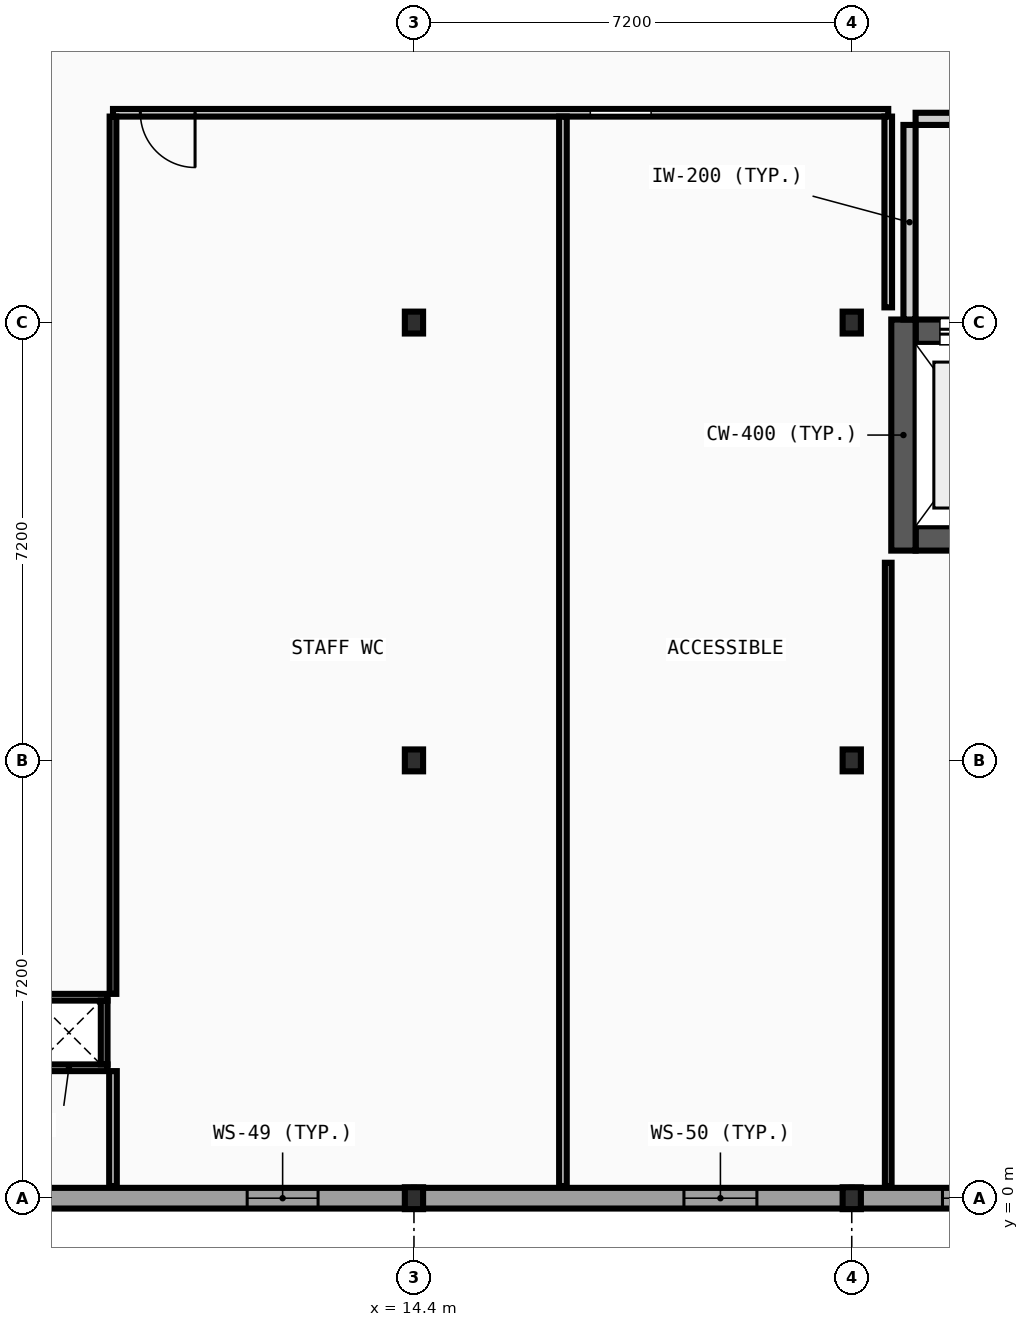
"""IFC4 building model, lengths in metres.
Left out: names, types, materials, properties, quantities, classifications, styles, units other than length and angle.
Written with IfcOpenShell. Run it as: python <this file> out.ifc"""

import sys

from ifc_helpers import new_model, si_unit, direction, frame, frame_2d, origin, origin_2d, place, context, subcontext, project, spatial, rectangle, i_section, extrude, element, fill, save


model = new_model("IFC4")
c1 = context("Model", 3, precision=1e-05, world=origin(), true_north=direction((0.0, 1.0)))
c2 = subcontext(c1, "Body", "Model", "MODEL_VIEW")
j1 = project(units=[si_unit("LENGTHUNIT", "METRE"), si_unit("PLANEANGLEUNIT", "RADIAN")], contexts=[c1])
p1 = place(None, origin())
s1 = spatial("IfcSite", under=j1, at=p1, CompositionType="ELEMENT")
p2 = place(p1, origin())
s2 = spatial("IfcBuilding", under=s1, at=p2, CompositionType="ELEMENT")
p3 = place(p2, frame((0.0, 0.0, 18.4)))
s3 = spatial("IfcBuildingStorey", under=s2, at=p3, CompositionType="ELEMENT", Elevation=18.4)
for number, where, z_axis, x_axis in (
    (1, (14.4, 0.0, 0.0), (0.0, 0.0, 1.0), (1.0, 0.0, 0.0)),
    (2, (14.4, 7.2, 0.0), (0.0, 0.0, 1.0), (1.0, 0.0, 0.0)),
    (3, (14.4, 14.4, 0.0), (0.0, 0.0, 1.0), (1.0, 0.0, 0.0)),
    (4, (21.6, 0.0, 0.0), (0.0, 0.0, 1.0), (1.0, 0.0, 0.0)),
    (5, (21.6, 7.2, 0.0), (0.0, 0.0, 1.0), (1.0, 0.0, 0.0)),
    (6, (21.6, 14.4, 0.0), (0.0, 0.0, 1.0), (1.0, 0.0, 0.0)),
):
    element("IfcColumn", number, at=place(p3, frame(where, z_axis=z_axis, x_axis=x_axis)), inside=s3, PredefinedType="COLUMN", context=c2, shape_type="SweptSolid", body=[
        extrude(i_section(OverallWidth=0.3, OverallDepth=0.36, WebThickness=0.012, FlangeThickness=0.022, FilletRadius=0.027, at=origin_2d()), origin(), (0.0, 0.0, 1.0), 4.4),
    ])
p4 = place(p3, frame((7.2, 0.0, 0.0), z_axis=(0.0, 0.0, 1.0), x_axis=(1.0, 0.0, 0.0)))
e7 = element("IfcWall", 7, at=p4, inside=s3, PredefinedType="STANDARD", context=c2, shape_type="SweptSolid", body=[
    extrude(rectangle(XDim=7.2, YDim=0.34, at=frame_2d((3.6, 0.0))), origin(), (0.0, 0.0, 1.0), 3.95),
])
p5 = place(p4, frame((4.457, 0.0, 0.95)))
e8 = element("IfcOpeningElement", 8, at=p5, cuts=e7, PredefinedType="OPENING", context=c2, shape_type="SweptSolid", body=[
    extrude(rectangle(XDim=1.166, YDim=1.368, at=frame_2d((0.583, 0.684))), frame((0.0, 0.18, 0.0), z_axis=(0.0, -1.0, 0.0), x_axis=(1.0, 0.0, 0.0)), (0.0, 0.0, 1.0), 0.36),
])
p6 = place(p3, frame((14.4, 0.0, 0.0), z_axis=(0.0, 0.0, 1.0), x_axis=(1.0, 0.0, 0.0)))
e9 = element("IfcWall", 9, at=p6, inside=s3, PredefinedType="STANDARD", context=c2, shape_type="SweptSolid", body=[
    extrude(rectangle(XDim=7.2, YDim=0.34, at=frame_2d((3.6, 0.0))), origin(), (0.0, 0.0, 1.0), 3.95),
])
p7 = place(p6, frame((4.44, 0.0, 0.95)))
e10 = element("IfcOpeningElement", 10, at=p7, cuts=e9, PredefinedType="OPENING", context=c2, shape_type="SweptSolid", body=[
    extrude(rectangle(XDim=1.2, YDim=1.368, at=frame_2d((0.6, 0.684))), frame((0.0, 0.18, 0.0), z_axis=(0.0, -1.0, 0.0), x_axis=(1.0, 0.0, 0.0)), (0.0, 0.0, 1.0), 0.36),
])
p8 = place(p3, frame((21.6, 0.0, 0.0), z_axis=(0.0, 0.0, 1.0), x_axis=(1.0, 0.0, 0.0)))
e11 = element("IfcWall", 11, at=p8, inside=s3, PredefinedType="STANDARD", context=c2, shape_type="SweptSolid", body=[
    extrude(rectangle(XDim=7.03, YDim=0.34, at=frame_2d((3.515, 0.0))), origin(), (0.0, 0.0, 1.0), 3.95),
])
p9 = place(p8, frame((1.492, 0.0, 0.95)))
e12 = element("IfcOpeningElement", 12, at=p9, cuts=e11, PredefinedType="OPENING", context=c2, shape_type="SweptSolid", body=[
    extrude(rectangle(XDim=1.234, YDim=1.368, at=frame_2d((0.617, 0.684))), frame((0.0, 0.18, 0.0), z_axis=(0.0, -1.0, 0.0), x_axis=(1.0, 0.0, 0.0)), (0.0, 0.0, 1.0), 0.36),
])
p10 = place(p8, frame((4.304, 0.0, 0.95)))
e13 = element("IfcOpeningElement", 13, at=p10, cuts=e11, PredefinedType="OPENING", context=c2, shape_type="SweptSolid", body=[
    extrude(rectangle(XDim=1.234, YDim=1.368, at=frame_2d((0.617, 0.684))), frame((0.0, 0.18, 0.0), z_axis=(0.0, -1.0, 0.0), x_axis=(1.0, 0.0, 0.0)), (0.0, 0.0, 1.0), 0.36),
])
p11 = place(p3, frame((22.65, 10.85, 0.0), z_axis=(0.0, 0.0, 1.0), x_axis=(1.0, 0.0, 0.0)))
e14 = element("IfcWall", 14, at=p11, inside=s3, PredefinedType="SHEAR", context=c2, shape_type="SweptSolid", body=[
    extrude(rectangle(XDim=2.2, YDim=0.4, at=frame_2d((1.1, 0.0))), origin(), (0.0, 0.0, 1.0), 4.215),
])
p12 = place(p3, frame((22.65, 14.25, 0.0), z_axis=(0.0, 0.0, 1.0), x_axis=(1.0, 0.0, 0.0)))
e15 = element("IfcWall", 15, at=p12, inside=s3, PredefinedType="SHEAR", context=c2, shape_type="SweptSolid", body=[
    extrude(rectangle(XDim=2.2, YDim=0.4, at=frame_2d((1.1, 0.0))), origin(), (0.0, 0.0, 1.0), 4.215),
])
p13 = place(p12, frame((0.4, 0.0, 0.0)))
e16 = element("IfcOpeningElement", 16, at=p13, cuts=e15, PredefinedType="OPENING", context=c2, shape_type="SweptSolid", body=[
    extrude(rectangle(XDim=1.4, YDim=2.2, at=frame_2d((0.7, 1.1))), frame((0.0, 0.21, 0.0), z_axis=(0.0, -1.0, 0.0), x_axis=(1.0, 0.0, 0.0)), (0.0, 0.0, 1.0), 0.42),
])
p14 = place(p3, frame((22.45, 10.65, 0.0), z_axis=(0.0, 0.0, 1.0), x_axis=(0.0, 1.0, 0.0)))
e17 = element("IfcWall", 17, at=p14, inside=s3, PredefinedType="SHEAR", context=c2, shape_type="SweptSolid", body=[
    extrude(rectangle(XDim=3.8, YDim=0.4, at=frame_2d((1.9, 0.0))), origin(), (0.0, 0.0, 1.0), 4.215),
])
p15 = place(p3, frame((22.65, 17.75, 0.0), z_axis=(0.0, 0.0, 1.0), x_axis=(1.0, 0.0, 0.0)))
e18 = element("IfcWall", 18, at=p15, inside=s3, PredefinedType="PARTITIONING", context=c2, shape_type="SweptSolid", body=[
    extrude(rectangle(XDim=5.75, YDim=0.2, at=frame_2d((2.875, 0.0))), origin(), (0.0, 0.0, 1.0), 4.215),
])
p16 = place(p15, frame((2.075, 0.0, 0.0)))
e19 = element("IfcOpeningElement", 19, at=p16, cuts=e18, PredefinedType="OPENING", context=c2, shape_type="SweptSolid", body=[
    extrude(rectangle(XDim=1.6, YDim=2.2, at=frame_2d((0.8, 1.1))), frame((0.0, 0.11, 0.0), z_axis=(0.0, -1.0, 0.0), x_axis=(1.0, 0.0, 0.0)), (0.0, 0.0, 1.0), 0.22),
])
p17 = place(p3, frame((22.55, 14.45, 0.0), z_axis=(0.0, 0.0, 1.0), x_axis=(0.0, 1.0, 0.0)))
e20 = element("IfcWall", 20, at=p17, inside=s3, PredefinedType="PARTITIONING", context=c2, shape_type="SweptSolid", body=[
    extrude(rectangle(XDim=3.2, YDim=0.2, at=frame_2d((1.6, 0.0))), origin(), (0.0, 0.0, 1.0), 4.215),
])
for number, where, z_axis, x_axis in (
    (21, (8.09, 2.145, 0.0), (0.0, 0.0, 1.0), (1.0, 0.0, 0.0)),
    (22, (8.09, 3.305, 0.0), (0.0, 0.0, 1.0), (1.0, 0.0, 0.0)),
):
    element("IfcWall", number, at=place(p3, frame(where, z_axis=z_axis, x_axis=x_axis)), inside=s3, PredefinedType="PARTITIONING", context=c2, shape_type="SweptSolid", body=[
        extrude(rectangle(XDim=1.27, YDim=0.11, at=frame_2d((0.635, 0.0))), origin(), (0.0, 0.0, 1.0), 4.215),
    ])
p18 = place(p3, frame((9.305, 2.2, 0.0), z_axis=(0.0, 0.0, 1.0), x_axis=(0.0, 1.0, 0.0)))
e23 = element("IfcWall", 23, at=p18, inside=s3, PredefinedType="PARTITIONING", context=c2, shape_type="SweptSolid", body=[
    extrude(rectangle(XDim=1.05, YDim=0.11, at=frame_2d((0.525, 0.0))), origin(), (0.0, 0.0, 1.0), 4.215),
])
p19 = place(p3, frame((9.45, 17.85, 0.0), z_axis=(0.0, 0.0, 1.0), x_axis=(1.0, 0.0, 0.0)))
e24 = element("IfcWall", 24, at=p19, inside=s3, PredefinedType="PARTITIONING", context=c2, shape_type="SweptSolid", body=[
    extrude(rectangle(XDim=12.75, YDim=0.125, at=frame_2d((6.375, 0.0))), origin(), (0.0, 0.0, 1.0), 4.215),
])
p20 = place(p19, frame((7.85, 0.0, 0.0)))
e25 = element("IfcOpeningElement", 25, at=p20, cuts=e24, PredefinedType="OPENING", context=c2, shape_type="SweptSolid", body=[
    extrude(rectangle(XDim=1.0, YDim=2.1, at=frame_2d((0.5, 1.05))), frame((0.0, 0.073, 0.0), z_axis=(0.0, -1.0, 0.0), x_axis=(1.0, 0.0, 0.0)), (0.0, 0.0, 1.0), 0.145),
])
p21 = place(p19, frame((0.45, 0.0, 0.0)))
e26 = element("IfcOpeningElement", 26, at=p21, cuts=e24, PredefinedType="OPENING", context=c2, shape_type="SweptSolid", body=[
    extrude(rectangle(XDim=0.9, YDim=2.1, at=frame_2d((0.45, 1.05))), frame((0.0, 0.073, 0.0), z_axis=(0.0, -1.0, 0.0), x_axis=(1.0, 0.0, 0.0)), (0.0, 0.0, 1.0), 0.145),
])
p22 = place(p3, frame((9.45, 0.2, 0.0), z_axis=(0.0, 0.0, 1.0), x_axis=(0.0, 1.0, 0.0)))
e27 = element("IfcWall", 27, at=p22, inside=s3, PredefinedType="PARTITIONING", context=c2, shape_type="SweptSolid", body=[
    extrude(rectangle(XDim=1.89, YDim=0.125, at=frame_2d((0.945, 0.0))), origin(), (0.0, 0.0, 1.0), 3.96),
])
p23 = place(p3, frame((9.45, 3.36, 0.0), z_axis=(0.0, 0.0, 1.0), x_axis=(0.0, 1.0, 0.0)))
e28 = element("IfcWall", 28, at=p23, inside=s3, PredefinedType="PARTITIONING", context=c2, shape_type="SweptSolid", body=[
    extrude(rectangle(XDim=14.427, YDim=0.11, at=frame_2d((7.214, 0.0))), origin(), (0.0, 0.0, 1.0), 3.96),
])
p24 = place(p3, frame((16.85, 0.2, 0.0), z_axis=(0.0, 0.0, 1.0), x_axis=(0.0, 1.0, 0.0)))
e29 = element("IfcWall", 29, at=p24, inside=s3, PredefinedType="PARTITIONING", context=c2, shape_type="SweptSolid", body=[
    extrude(rectangle(XDim=17.588, YDim=0.125, at=frame_2d((8.794, 0.0))), origin(), (0.0, 0.0, 1.0), 3.96),
])
p25 = place(p3, frame((22.2, 0.2, 0.0), z_axis=(0.0, 0.0, 1.0), x_axis=(0.0, 1.0, 0.0)))
e30 = element("IfcWall", 30, at=p25, inside=s3, PredefinedType="PARTITIONING", context=c2, shape_type="SweptSolid", body=[
    extrude(rectangle(XDim=10.25, YDim=0.11, at=frame_2d((5.125, 0.0))), origin(), (0.0, 0.0, 1.0), 4.215),
])
p26 = place(p3, frame((22.2, 14.65, 0.0), z_axis=(0.0, 0.0, 1.0), x_axis=(0.0, 1.0, 0.0)))
e31 = element("IfcWall", 31, at=p26, inside=s3, PredefinedType="PARTITIONING", context=c2, shape_type="SweptSolid", body=[
    extrude(rectangle(XDim=3.138, YDim=0.125, at=frame_2d((1.569, 0.0))), origin(), (0.0, 0.0, 1.0), 4.215),
])
p27 = place(p5, origin())
e32 = element("IfcWindow", 32, at=p27, inside=s3, PartitioningType="SINGLE_PANEL", PredefinedType="WINDOW", context=c2, shape_type="SweptSolid", body=[
    extrude(rectangle(XDim=1.166, YDim=1.368, at=frame_2d((0.583, 0.684))), frame((0.0, 0.03, 0.0), z_axis=(0.0, -1.0, 0.0), x_axis=(1.0, 0.0, 0.0)), (0.0, 0.0, 1.0), 0.06),
])
fill(e8, e32)
p28 = place(p7, origin())
e33 = element("IfcWindow", 33, at=p28, inside=s3, PartitioningType="SINGLE_PANEL", PredefinedType="WINDOW", context=c2, shape_type="SweptSolid", body=[
    extrude(rectangle(XDim=1.2, YDim=1.368, at=frame_2d((0.6, 0.684))), frame((0.0, 0.03, 0.0), z_axis=(0.0, -1.0, 0.0), x_axis=(1.0, 0.0, 0.0)), (0.0, 0.0, 1.0), 0.06),
])
fill(e10, e33)
p29 = place(p9, origin())
e34 = element("IfcWindow", 34, at=p29, inside=s3, PartitioningType="SINGLE_PANEL", PredefinedType="WINDOW", context=c2, shape_type="SweptSolid", body=[
    extrude(rectangle(XDim=1.234, YDim=1.368, at=frame_2d((0.617, 0.684))), frame((0.0, 0.03, 0.0), z_axis=(0.0, -1.0, 0.0), x_axis=(1.0, 0.0, 0.0)), (0.0, 0.0, 1.0), 0.06),
])
fill(e12, e34)
p30 = place(p13, origin())
e35 = element("IfcDoor", 35, at=p30, inside=s3, OperationType="SLIDING_TO_LEFT", PredefinedType="DOOR", context=c2, shape_type="SweptSolid", body=[
    extrude(rectangle(XDim=1.4, YDim=2.2, at=frame_2d((0.7, 1.1))), frame((0.0, 0.025, 0.0), z_axis=(0.0, -1.0, 0.0), x_axis=(1.0, 0.0, 0.0)), (0.0, 0.0, 1.0), 0.05),
])
fill(e16, e35)
p31 = place(p20, origin())
e36 = element("IfcDoor", 36, at=p31, inside=s3, OperationType="SLIDING_TO_LEFT", PredefinedType="DOOR", context=c2, shape_type="SweptSolid", body=[
    extrude(rectangle(XDim=1.0, YDim=2.1, at=frame_2d((0.5, 1.05))), frame((0.0, 0.025, 0.0), z_axis=(0.0, -1.0, 0.0), x_axis=(1.0, 0.0, 0.0)), (0.0, 0.0, 1.0), 0.05),
])
fill(e25, e36)
p32 = place(p21, origin())
e37 = element("IfcDoor", 37, at=p32, inside=s3, OperationType="SINGLE_SWING_RIGHT", PredefinedType="DOOR", context=c2, shape_type="SweptSolid", body=[
    extrude(rectangle(XDim=0.9, YDim=2.1, at=frame_2d((0.45, 1.05))), frame((0.0, 0.025, 0.0), z_axis=(0.0, -1.0, 0.0), x_axis=(1.0, 0.0, 0.0)), (0.0, 0.0, 1.0), 0.05),
])
fill(e26, e37)
save(model, sys.argv[1])
